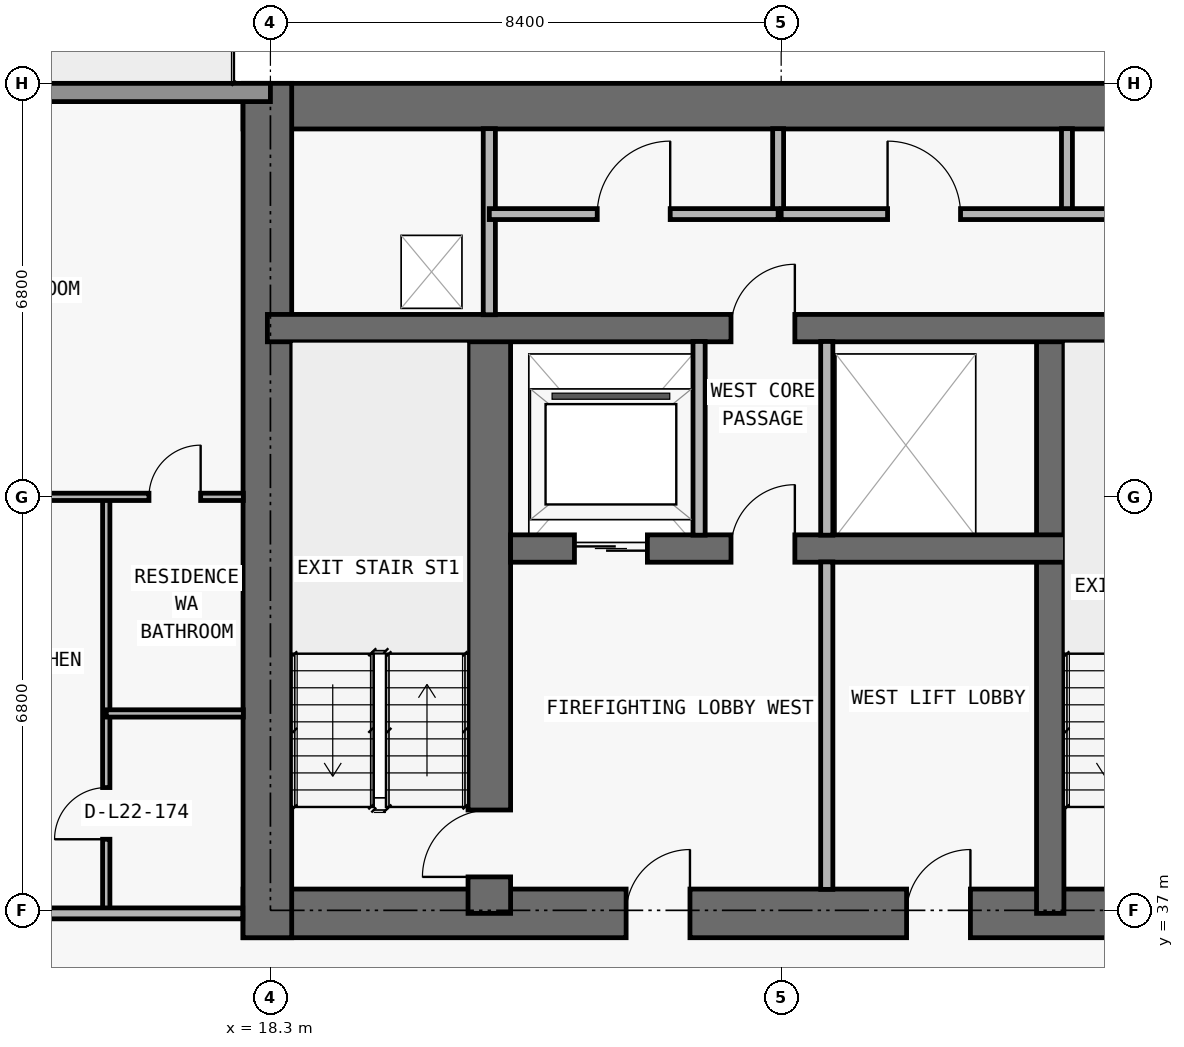
"""IFC4 building model, lengths in metres.
Left out: names, types, materials, properties, quantities, classifications, styles, units other than length and angle.
Written with IfcOpenShell. Run it as: python <this file> out.ifc"""

import sys

from ifc_helpers import new_model, si_unit, direction, frame, frame_2d, origin, place, context, subcontext, project, spatial, rectangle, extrude, element, fill, save


model = new_model("IFC4")
c1 = context("Model", 3, precision=1e-05, world=origin(), true_north=direction((0.0, 1.0)))
c2 = subcontext(c1, "Body", "Model", "MODEL_VIEW")
j1 = project(units=[si_unit("LENGTHUNIT", "METRE"), si_unit("PLANEANGLEUNIT", "RADIAN")], contexts=[c1])
p1 = place(None, origin())
s1 = spatial("IfcSite", under=j1, at=p1, CompositionType="ELEMENT")
p2 = place(p1, origin())
s2 = spatial("IfcBuilding", under=s1, at=p2, CompositionType="ELEMENT")
p3 = place(p2, frame((0.0, 0.0, 84.6)))
s3 = spatial("IfcBuildingStorey", under=s2, at=p3, CompositionType="ELEMENT", Elevation=84.6)
p4 = place(p3, frame((17.85, 36.95, 0.0), z_axis=(0.0, 0.0, 1.0), x_axis=(1.0, 0.0, 0.0)))
e1 = element("IfcWall", 1, at=p4, inside=s3, PredefinedType="SHEAR", context=c2, shape_type="SweptSolid", body=[
    extrude(rectangle(XDim=42.1, YDim=0.8, at=frame_2d((21.05, 0.0))), origin(), (0.0, 0.0, 1.0), 3.05),
])
p5 = place(p4, frame((14.45, 0.0, 0.0)))
e2 = element("IfcOpeningElement", 2, at=p5, cuts=e1, PredefinedType="OPENING", context=c2, shape_type="SweptSolid", body=[
    extrude(rectangle(XDim=1.1, YDim=2.15, at=frame_2d((0.55, 1.075))), frame((0.0, 0.41, 0.0), z_axis=(0.0, -1.0, 0.0), x_axis=(1.0, 0.0, 0.0)), (0.0, 0.0, 1.0), 0.82),
])
p6 = place(p4, frame((6.3, 0.0, 0.0)))
e3 = element("IfcOpeningElement", 3, at=p6, cuts=e1, PredefinedType="OPENING", context=c2, shape_type="SweptSolid", body=[
    extrude(rectangle(XDim=1.05, YDim=2.15, at=frame_2d((0.525, 1.075))), frame((0.0, 0.41, 0.0), z_axis=(0.0, -1.0, 0.0), x_axis=(1.0, 0.0, 0.0)), (0.0, 0.0, 1.0), 0.82),
])
p7 = place(p4, frame((34.8, 0.0, 0.0)))
e4 = element("IfcOpeningElement", 4, at=p7, cuts=e1, PredefinedType="OPENING", context=c2, shape_type="SweptSolid", body=[
    extrude(rectangle(XDim=1.05, YDim=2.15, at=frame_2d((0.525, 1.075))), frame((0.0, 0.41, 0.0), z_axis=(0.0, -1.0, 0.0), x_axis=(1.0, 0.0, 0.0)), (0.0, 0.0, 1.0), 0.82),
])
p8 = place(p4, frame((10.913, 0.0, 0.0)))
e5 = element("IfcOpeningElement", 5, at=p8, cuts=e1, PredefinedType="OPENING", context=c2, shape_type="SweptSolid", body=[
    extrude(rectangle(XDim=1.05, YDim=2.15, at=frame_2d((0.525, 1.075))), frame((0.0, 0.41, 0.0), z_axis=(0.0, -1.0, 0.0), x_axis=(1.0, 0.0, 0.0)), (0.0, 0.0, 1.0), 0.82),
])
p9 = place(p4, frame((24.15, 0.0, 0.0)))
e6 = element("IfcOpeningElement", 6, at=p9, cuts=e1, PredefinedType="OPENING", context=c2, shape_type="SweptSolid", body=[
    extrude(rectangle(XDim=1.05, YDim=2.15, at=frame_2d((0.525, 1.075))), frame((0.0, 0.41, 0.0), z_axis=(0.0, -1.0, 0.0), x_axis=(1.0, 0.0, 0.0)), (0.0, 0.0, 1.0), 0.82),
])
p10 = place(p3, frame((17.85, 50.225, 0.0), z_axis=(0.0, 0.0, 1.0), x_axis=(1.0, 0.0, 0.0)))
e7 = element("IfcWall", 7, at=p10, inside=s3, PredefinedType="SHEAR", context=c2, shape_type="SweptSolid", body=[
    extrude(rectangle(XDim=42.1, YDim=0.75, at=frame_2d((21.05, 0.0))), origin(), (0.0, 0.0, 1.0), 3.05),
])
p11 = place(p3, frame((18.25, 36.55, 0.0), z_axis=(0.0, 0.0, 1.0), x_axis=(0.0, 1.0, 0.0)))
e8 = element("IfcWall", 8, at=p11, inside=s3, PredefinedType="SHEAR", context=c2, shape_type="SweptSolid", body=[
    extrude(rectangle(XDim=14.05, YDim=0.8, at=frame_2d((7.025, 0.0))), origin(), (0.0, 0.0, 1.0), 3.05),
])
p12 = place(p3, frame((21.9, 36.95, 0.0), z_axis=(0.0, 0.0, 1.0), x_axis=(0.0, 1.0, 0.0)))
e9 = element("IfcWall", 9, at=p12, inside=s3, PredefinedType="SHEAR", context=c2, shape_type="SweptSolid", body=[
    extrude(rectangle(XDim=9.625, YDim=0.7, at=frame_2d((4.812, 0.0))), origin(), (0.0, 0.0, 1.0), 3.05),
])
p13 = place(p12, frame((0.6, 0.0, 0.0)))
e10 = element("IfcOpeningElement", 10, at=p13, cuts=e9, PredefinedType="OPENING", context=c2, shape_type="SweptSolid", body=[
    extrude(rectangle(XDim=1.1, YDim=2.15, at=frame_2d((0.55, 1.075))), frame((0.0, 0.36, 0.0), z_axis=(0.0, -1.0, 0.0), x_axis=(1.0, 0.0, 0.0)), (0.0, 0.0, 1.0), 0.72),
])
p14 = place(p3, frame((31.125, 36.95, 0.0), z_axis=(0.0, 0.0, 1.0), x_axis=(0.0, 1.0, 0.0)))
e11 = element("IfcWall", 11, at=p14, inside=s3, PredefinedType="SHEAR", context=c2, shape_type="SweptSolid", body=[
    extrude(rectangle(XDim=9.625, YDim=0.45, at=frame_2d((4.812, 0.0))), origin(), (0.0, 0.0, 1.0), 3.05),
])
p15 = place(p3, frame((22.25, 42.95, 0.0), z_axis=(0.0, 0.0, 1.0), x_axis=(1.0, 0.0, 0.0)))
e12 = element("IfcWall", 12, at=p15, inside=s3, PredefinedType="SHEAR", context=c2, shape_type="SweptSolid", body=[
    extrude(rectangle(XDim=33.3, YDim=0.45, at=frame_2d((16.65, 0.0))), origin(), (0.0, 0.0, 1.0), 3.05),
])
p16 = place(p15, frame((1.05, 0.0, 0.0)))
e13 = element("IfcOpeningElement", 13, at=p16, cuts=e12, PredefinedType="OPENING", context=c2, shape_type="SweptSolid", body=[
    extrude(rectangle(XDim=1.2, YDim=2.2, at=frame_2d((0.6, 1.1))), frame((0.0, 0.235, 0.0), z_axis=(0.0, -1.0, 0.0), x_axis=(1.0, 0.0, 0.0)), (0.0, 0.0, 1.0), 0.47),
])
p17 = place(p15, frame((31.05, 0.0, 0.0)))
e14 = element("IfcOpeningElement", 14, at=p17, cuts=e12, PredefinedType="OPENING", context=c2, shape_type="SweptSolid", body=[
    extrude(rectangle(XDim=1.2, YDim=2.2, at=frame_2d((0.6, 1.1))), frame((0.0, 0.235, 0.0), z_axis=(0.0, -1.0, 0.0), x_axis=(1.0, 0.0, 0.0)), (0.0, 0.0, 1.0), 0.47),
])
p18 = place(p15, frame((13.5, 0.0, 0.0)))
e15 = element("IfcOpeningElement", 15, at=p18, cuts=e12, PredefinedType="OPENING", context=c2, shape_type="SweptSolid", body=[
    extrude(rectangle(XDim=1.1, YDim=2.2, at=frame_2d((0.55, 1.1))), frame((0.0, 0.235, 0.0), z_axis=(0.0, -1.0, 0.0), x_axis=(1.0, 0.0, 0.0)), (0.0, 0.0, 1.0), 0.47),
])
p19 = place(p15, frame((16.1, 0.0, 0.0)))
e16 = element("IfcOpeningElement", 16, at=p19, cuts=e12, PredefinedType="OPENING", context=c2, shape_type="SweptSolid", body=[
    extrude(rectangle(XDim=1.1, YDim=2.2, at=frame_2d((0.55, 1.1))), frame((0.0, 0.235, 0.0), z_axis=(0.0, -1.0, 0.0), x_axis=(1.0, 0.0, 0.0)), (0.0, 0.0, 1.0), 0.47),
])
p20 = place(p15, frame((18.7, 0.0, 0.0)))
e17 = element("IfcOpeningElement", 17, at=p20, cuts=e12, PredefinedType="OPENING", context=c2, shape_type="SweptSolid", body=[
    extrude(rectangle(XDim=1.1, YDim=2.2, at=frame_2d((0.55, 1.1))), frame((0.0, 0.235, 0.0), z_axis=(0.0, -1.0, 0.0), x_axis=(1.0, 0.0, 0.0)), (0.0, 0.0, 1.0), 0.47),
])
p21 = place(p15, frame((3.625, 0.0, 0.0)))
e18 = element("IfcOpeningElement", 18, at=p21, cuts=e12, PredefinedType="OPENING", context=c2, shape_type="SweptSolid", body=[
    extrude(rectangle(XDim=1.05, YDim=2.15, at=frame_2d((0.525, 1.075))), frame((0.0, 0.235, 0.0), z_axis=(0.0, -1.0, 0.0), x_axis=(1.0, 0.0, 0.0)), (0.0, 0.0, 1.0), 0.47),
])
p22 = place(p15, frame((28.675, 0.0, 0.0)))
e19 = element("IfcOpeningElement", 19, at=p22, cuts=e12, PredefinedType="OPENING", context=c2, shape_type="SweptSolid", body=[
    extrude(rectangle(XDim=1.05, YDim=2.15, at=frame_2d((0.525, 1.075))), frame((0.0, 0.235, 0.0), z_axis=(0.0, -1.0, 0.0), x_axis=(1.0, 0.0, 0.0)), (0.0, 0.0, 1.0), 0.47),
])
p23 = place(p3, frame((18.25, 46.575, 0.0), z_axis=(0.0, 0.0, 1.0), x_axis=(1.0, 0.0, 0.0)))
e20 = element("IfcWall", 20, at=p23, inside=s3, PredefinedType="SHEAR", context=c2, shape_type="SweptSolid", body=[
    extrude(rectangle(XDim=41.3, YDim=0.45, at=frame_2d((20.65, 0.0))), origin(), (0.0, 0.0, 1.0), 3.05),
])
p24 = place(p23, frame((7.625, 0.0, 0.0)))
e21 = element("IfcOpeningElement", 21, at=p24, cuts=e20, PredefinedType="OPENING", context=c2, shape_type="SweptSolid", body=[
    extrude(rectangle(XDim=1.05, YDim=2.15, at=frame_2d((0.525, 1.075))), frame((0.0, 0.235, 0.0), z_axis=(0.0, -1.0, 0.0), x_axis=(1.0, 0.0, 0.0)), (0.0, 0.0, 1.0), 0.47),
])
p25 = place(p23, frame((32.675, 0.0, 0.0)))
e22 = element("IfcOpeningElement", 22, at=p25, cuts=e20, PredefinedType="OPENING", context=c2, shape_type="SweptSolid", body=[
    extrude(rectangle(XDim=1.05, YDim=2.15, at=frame_2d((0.525, 1.075))), frame((0.0, 0.235, 0.0), z_axis=(0.0, -1.0, 0.0), x_axis=(1.0, 0.0, 0.0)), (0.0, 0.0, 1.0), 0.47),
])
p26 = place(p3, frame((7.7, 50.45, 0.0), z_axis=(0.0, 0.0, 1.0), x_axis=(1.0, 0.0, 0.0)))
e23 = element("IfcWall", 23, at=p26, inside=s3, PredefinedType="STANDARD", context=c2, shape_type="SweptSolid", body=[
    extrude(rectangle(XDim=10.6, YDim=0.3, at=frame_2d((5.3, 0.0))), origin(), (0.0, 0.0, 1.0), 3.05),
])
p27 = place(p26, frame((4.3, 0.0, 0.0)))
e24 = element("IfcOpeningElement", 24, at=p27, cuts=e23, PredefinedType="OPENING", context=c2, shape_type="SweptSolid", body=[
    extrude(rectangle(XDim=2.0, YDim=2.3, at=frame_2d((1.0, 1.15))), frame((0.0, 0.16, 0.0), z_axis=(0.0, -1.0, 0.0), x_axis=(1.0, 0.0, 0.0)), (0.0, 0.0, 1.0), 0.32),
])
p28 = place(p3, frame((15.6, 36.95, 0.0), z_axis=(0.0, 0.0, 1.0), x_axis=(0.0, 1.0, 0.0)))
e25 = element("IfcWall", 25, at=p28, inside=s3, PredefinedType="PARTITIONING", context=c2, shape_type="SweptSolid", body=[
    extrude(rectangle(XDim=6.85, YDim=0.12, at=frame_2d((3.425, 0.0))), origin(), (0.0, 0.0, 1.0), 3.05),
])
p29 = place(p28, frame((1.219, 0.0, 0.0)))
e26 = element("IfcOpeningElement", 26, at=p29, cuts=e25, PredefinedType="OPENING", context=c2, shape_type="SweptSolid", body=[
    extrude(rectangle(XDim=0.85, YDim=2.1, at=frame_2d((0.425, 1.05))), frame((0.0, 0.07, 0.0), z_axis=(0.0, -1.0, 0.0), x_axis=(1.0, 0.0, 0.0)), (0.0, 0.0, 1.0), 0.14),
])
p30 = place(p3, frame((21.9, 46.795, 0.0), z_axis=(0.0, 0.0, 1.0), x_axis=(0.0, 1.0, 0.0)))
e27 = element("IfcWall", 27, at=p30, inside=s3, PredefinedType="PARTITIONING", context=c2, shape_type="SweptSolid", body=[
    extrude(rectangle(XDim=3.06, YDim=0.2, at=frame_2d((1.53, 0.0))), origin(), (0.0, 0.0, 1.0), 3.05),
])
p31 = place(p3, frame((25.35, 43.17, 0.0), z_axis=(0.0, 0.0, 1.0), x_axis=(0.0, 1.0, 0.0)))
e28 = element("IfcWall", 28, at=p31, inside=s3, PredefinedType="PARTITIONING", context=c2, shape_type="SweptSolid", body=[
    extrude(rectangle(XDim=3.185, YDim=0.2, at=frame_2d((1.593, 0.0))), origin(), (0.0, 0.0, 1.0), 3.05),
])
p32 = place(p3, frame((26.65, 48.45, 0.0), z_axis=(0.0, 0.0, 1.0), x_axis=(0.0, 1.0, 0.0)))
e29 = element("IfcWall", 29, at=p32, inside=s3, PredefinedType="PARTITIONING", context=c2, shape_type="SweptSolid", body=[
    extrude(rectangle(XDim=1.405, YDim=0.18, at=frame_2d((0.703, 0.0))), origin(), (0.0, 0.0, 1.0), 3.05),
])
p33 = place(p3, frame((27.45, 37.345, 0.0), z_axis=(0.0, 0.0, 1.0), x_axis=(0.0, 1.0, 0.0)))
e30 = element("IfcWall", 30, at=p33, inside=s3, PredefinedType="PARTITIONING", context=c2, shape_type="SweptSolid", body=[
    extrude(rectangle(XDim=5.385, YDim=0.2, at=frame_2d((2.692, 0.0))), origin(), (0.0, 0.0, 1.0), 3.05),
])
p34 = place(p3, frame((27.45, 43.17, 0.0), z_axis=(0.0, 0.0, 1.0), x_axis=(0.0, 1.0, 0.0)))
e31 = element("IfcWall", 31, at=p34, inside=s3, PredefinedType="PARTITIONING", context=c2, shape_type="SweptSolid", body=[
    extrude(rectangle(XDim=3.185, YDim=0.2, at=frame_2d((1.593, 0.0))), origin(), (0.0, 0.0, 1.0), 3.05),
])
p35 = place(p3, frame((31.4, 48.45, 0.0), z_axis=(0.0, 0.0, 1.0), x_axis=(0.0, 1.0, 0.0)))
e32 = element("IfcWall", 32, at=p35, inside=s3, PredefinedType="PARTITIONING", context=c2, shape_type="SweptSolid", body=[
    extrude(rectangle(XDim=1.405, YDim=0.18, at=frame_2d((0.703, 0.0))), origin(), (0.0, 0.0, 1.0), 3.05),
])
p36 = place(p3, frame((7.7, 36.95, 0.0), z_axis=(0.0, 0.0, 1.0), x_axis=(1.0, 0.0, 0.0)))
e33 = element("IfcWall", 33, at=p36, inside=s3, PredefinedType="PARTITIONING", context=c2, shape_type="SweptSolid", body=[
    extrude(rectangle(XDim=10.145, YDim=0.18, at=frame_2d((5.073, 0.0))), origin(), (0.0, 0.0, 1.0), 3.05),
])
p37 = place(p36, frame((5.188, 0.0, 0.0)))
e34 = element("IfcOpeningElement", 34, at=p37, cuts=e33, PredefinedType="OPENING", context=c2, shape_type="SweptSolid", body=[
    extrude(rectangle(XDim=1.0, YDim=2.2, at=frame_2d((0.5, 1.1))), frame((0.0, 0.1, 0.0), z_axis=(0.0, -1.0, 0.0), x_axis=(1.0, 0.0, 0.0)), (0.0, 0.0, 1.0), 0.2),
])
p38 = place(p3, frame((15.6, 40.238, 0.0), z_axis=(0.0, 0.0, 1.0), x_axis=(1.0, 0.0, 0.0)))
e35 = element("IfcWall", 35, at=p38, inside=s3, PredefinedType="PARTITIONING", context=c2, shape_type="SweptSolid", body=[
    extrude(rectangle(XDim=2.255, YDim=0.12, at=frame_2d((1.127, 0.0))), origin(), (0.0, 0.0, 1.0), 3.05),
])
p39 = place(p3, frame((4.195, 43.8, 0.0), z_axis=(0.0, 0.0, 1.0), x_axis=(1.0, 0.0, 0.0)))
e36 = element("IfcWall", 36, at=p39, inside=s3, PredefinedType="PARTITIONING", context=c2, shape_type="SweptSolid", body=[
    extrude(rectangle(XDim=13.66, YDim=0.12, at=frame_2d((6.83, 0.0))), origin(), (0.0, 0.0, 1.0), 2.339),
])
p40 = place(p39, frame((8.743, 0.0, 0.0)))
e37 = element("IfcOpeningElement", 37, at=p40, cuts=e36, PredefinedType="OPENING", context=c2, shape_type="SweptSolid", body=[
    extrude(rectangle(XDim=0.9, YDim=2.15, at=frame_2d((0.45, 1.075))), frame((0.0, 0.07, 0.0), z_axis=(0.0, -1.0, 0.0), x_axis=(1.0, 0.0, 0.0)), (0.0, 0.0, 1.0), 0.14),
])
p41 = place(p39, frame((12.107, 0.0, 0.0)))
e38 = element("IfcOpeningElement", 38, at=p41, cuts=e36, PredefinedType="OPENING", context=c2, shape_type="SweptSolid", body=[
    extrude(rectangle(XDim=0.85, YDim=2.1, at=frame_2d((0.425, 1.05))), frame((0.0, 0.07, 0.0), z_axis=(0.0, -1.0, 0.0), x_axis=(1.0, 0.0, 0.0)), (0.0, 0.0, 1.0), 0.14),
])
p42 = place(p3, frame((21.9, 48.45, 0.0), z_axis=(0.0, 0.0, 1.0), x_axis=(1.0, 0.0, 0.0)))
e39 = element("IfcWall", 39, at=p42, inside=s3, PredefinedType="PARTITIONING", context=c2, shape_type="SweptSolid", body=[
    extrude(rectangle(XDim=4.75, YDim=0.18, at=frame_2d((2.375, 0.0))), origin(), (0.0, 0.0, 1.0), 3.05),
])
p43 = place(p42, frame((1.775, 0.0, 0.0)))
e40 = element("IfcOpeningElement", 40, at=p43, cuts=e39, PredefinedType="OPENING", context=c2, shape_type="SweptSolid", body=[
    extrude(rectangle(XDim=1.2, YDim=2.2, at=frame_2d((0.6, 1.1))), frame((0.0, 0.1, 0.0), z_axis=(0.0, -1.0, 0.0), x_axis=(1.0, 0.0, 0.0)), (0.0, 0.0, 1.0), 0.2),
])
p44 = place(p3, frame((26.7, 48.45, 0.0), z_axis=(0.0, 0.0, 1.0), x_axis=(1.0, 0.0, 0.0)))
e41 = element("IfcWall", 41, at=p44, inside=s3, PredefinedType="PARTITIONING", context=c2, shape_type="SweptSolid", body=[
    extrude(rectangle(XDim=29.186, YDim=0.18, at=frame_2d((14.593, 0.0))), origin(), (0.0, 0.0, 1.0), 3.05),
])
p45 = place(p44, frame((1.75, 0.0, 0.0)))
e42 = element("IfcOpeningElement", 42, at=p45, cuts=e41, PredefinedType="OPENING", context=c2, shape_type="SweptSolid", body=[
    extrude(rectangle(XDim=1.2, YDim=2.2, at=frame_2d((0.6, 1.1))), frame((0.0, 0.1, 0.0), z_axis=(0.0, -1.0, 0.0), x_axis=(1.0, 0.0, 0.0)), (0.0, 0.0, 1.0), 0.2),
])
p46 = place(p44, frame((6.475, 0.0, 0.0)))
e43 = element("IfcOpeningElement", 43, at=p46, cuts=e41, PredefinedType="OPENING", context=c2, shape_type="SweptSolid", body=[
    extrude(rectangle(XDim=1.2, YDim=2.2, at=frame_2d((0.6, 1.1))), frame((0.0, 0.1, 0.0), z_axis=(0.0, -1.0, 0.0), x_axis=(1.0, 0.0, 0.0)), (0.0, 0.0, 1.0), 0.2),
])
p47 = place(p44, frame((14.05, 0.0, 0.0)))
e44 = element("IfcOpeningElement", 44, at=p47, cuts=e41, PredefinedType="OPENING", context=c2, shape_type="SweptSolid", body=[
    extrude(rectangle(XDim=1.0, YDim=2.2, at=frame_2d((0.5, 1.1))), frame((0.0, 0.1, 0.0), z_axis=(0.0, -1.0, 0.0), x_axis=(1.0, 0.0, 0.0)), (0.0, 0.0, 1.0), 0.2),
])
p48 = place(p44, frame((21.425, 0.0, 0.0)))
e45 = element("IfcOpeningElement", 45, at=p48, cuts=e41, PredefinedType="OPENING", context=c2, shape_type="SweptSolid", body=[
    extrude(rectangle(XDim=1.2, YDim=2.2, at=frame_2d((0.6, 1.1))), frame((0.0, 0.1, 0.0), z_axis=(0.0, -1.0, 0.0), x_axis=(1.0, 0.0, 0.0)), (0.0, 0.0, 1.0), 0.2),
])
p49 = place(p44, frame((26.368, 0.0, 0.0)))
e46 = element("IfcOpeningElement", 46, at=p49, cuts=e41, PredefinedType="OPENING", context=c2, shape_type="SweptSolid", body=[
    extrude(rectangle(XDim=0.85, YDim=2.1, at=frame_2d((0.425, 1.05))), frame((0.0, 0.1, 0.0), z_axis=(0.0, -1.0, 0.0), x_axis=(1.0, 0.0, 0.0)), (0.0, 0.0, 1.0), 0.2),
])
p50 = place(p16, origin())
e47 = element("IfcDoor", 47, at=p50, inside=s3, OperationType="DOUBLE_DOOR_SLIDING", PredefinedType="DOOR", context=c2, shape_type="SweptSolid", body=[
    extrude(rectangle(XDim=1.2, YDim=2.2, at=frame_2d((0.6, 1.1))), frame((0.0, 0.025, 0.0), z_axis=(0.0, -1.0, 0.0), x_axis=(1.0, 0.0, 0.0)), (0.0, 0.0, 1.0), 0.05),
])
fill(e13, e47)
p51 = place(p6, origin())
e48 = element("IfcDoor", 48, at=p51, inside=s3, OperationType="SINGLE_SWING_RIGHT", PredefinedType="DOOR", context=c2, shape_type="SweptSolid", body=[
    extrude(rectangle(XDim=1.05, YDim=2.15, at=frame_2d((0.525, 1.075))), frame((0.0, 0.025, 0.0), z_axis=(0.0, -1.0, 0.0), x_axis=(1.0, 0.0, 0.0)), (0.0, 0.0, 1.0), 0.05),
])
fill(e3, e48)
p52 = place(p13, origin())
e49 = element("IfcDoor", 49, at=p52, inside=s3, OperationType="SINGLE_SWING_LEFT", PredefinedType="DOOR", context=c2, shape_type="SweptSolid", body=[
    extrude(rectangle(XDim=1.1, YDim=2.15, at=frame_2d((0.55, 1.075))), frame((0.0, 0.025, 0.0), z_axis=(0.0, -1.0, 0.0), x_axis=(1.0, 0.0, 0.0)), (0.0, 0.0, 1.0), 0.05),
])
fill(e10, e49)
p53 = place(p21, origin())
e50 = element("IfcDoor", 50, at=p53, inside=s3, OperationType="SINGLE_SWING_RIGHT", PredefinedType="DOOR", context=c2, shape_type="SweptSolid", body=[
    extrude(rectangle(XDim=1.05, YDim=2.15, at=frame_2d((0.525, 1.075))), frame((0.0, 0.025, 0.0), z_axis=(0.0, -1.0, 0.0), x_axis=(1.0, 0.0, 0.0)), (0.0, 0.0, 1.0), 0.05),
])
fill(e18, e50)
p54 = place(p8, origin())
e51 = element("IfcDoor", 51, at=p54, inside=s3, OperationType="SINGLE_SWING_RIGHT", PredefinedType="DOOR", context=c2, shape_type="SweptSolid", body=[
    extrude(rectangle(XDim=1.05, YDim=2.15, at=frame_2d((0.525, 1.075))), frame((0.0, 0.025, 0.0), z_axis=(0.0, -1.0, 0.0), x_axis=(1.0, 0.0, 0.0)), (0.0, 0.0, 1.0), 0.05),
])
fill(e5, e51)
p55 = place(p24, origin())
e52 = element("IfcDoor", 52, at=p55, inside=s3, OperationType="SINGLE_SWING_RIGHT", PredefinedType="DOOR", context=c2, shape_type="SweptSolid", body=[
    extrude(rectangle(XDim=1.05, YDim=2.15, at=frame_2d((0.525, 1.075))), frame((0.0, 0.025, 0.0), z_axis=(0.0, -1.0, 0.0), x_axis=(1.0, 0.0, 0.0)), (0.0, 0.0, 1.0), 0.05),
])
fill(e21, e52)
p56 = place(p43, origin())
e53 = element("IfcDoor", 53, at=p56, inside=s3, OperationType="SINGLE_SWING_RIGHT", PredefinedType="DOOR", context=c2, shape_type="SweptSolid", body=[
    extrude(rectangle(XDim=1.2, YDim=2.2, at=frame_2d((0.6, 1.1))), frame((0.0, 0.025, 0.0), z_axis=(0.0, -1.0, 0.0), x_axis=(1.0, 0.0, 0.0)), (0.0, 0.0, 1.0), 0.05),
])
fill(e40, e53)
p57 = place(p45, origin())
e54 = element("IfcDoor", 54, at=p57, inside=s3, OperationType="SINGLE_SWING_LEFT", PredefinedType="DOOR", context=c2, shape_type="SweptSolid", body=[
    extrude(rectangle(XDim=1.2, YDim=2.2, at=frame_2d((0.6, 1.1))), frame((0.0, 0.025, 0.0), z_axis=(0.0, -1.0, 0.0), x_axis=(1.0, 0.0, 0.0)), (0.0, 0.0, 1.0), 0.05),
])
fill(e42, e54)
p58 = place(p29, origin())
e55 = element("IfcDoor", 55, at=p58, inside=s3, OperationType="SINGLE_SWING_LEFT", PredefinedType="DOOR", context=c2, shape_type="SweptSolid", body=[
    extrude(rectangle(XDim=0.85, YDim=2.1, at=frame_2d((0.425, 1.05))), frame((0.0, 0.025, 0.0), z_axis=(0.0, -1.0, 0.0), x_axis=(1.0, 0.0, 0.0)), (0.0, 0.0, 1.0), 0.05),
])
fill(e26, e55)
p59 = place(p41, origin())
e56 = element("IfcDoor", 56, at=p59, inside=s3, OperationType="SINGLE_SWING_RIGHT", PredefinedType="DOOR", context=c2, shape_type="SweptSolid", body=[
    extrude(rectangle(XDim=0.85, YDim=2.1, at=frame_2d((0.425, 1.05))), frame((0.0, 0.025, 0.0), z_axis=(0.0, -1.0, 0.0), x_axis=(1.0, 0.0, 0.0)), (0.0, 0.0, 1.0), 0.05),
])
fill(e38, e56)
save(model, sys.argv[1])
